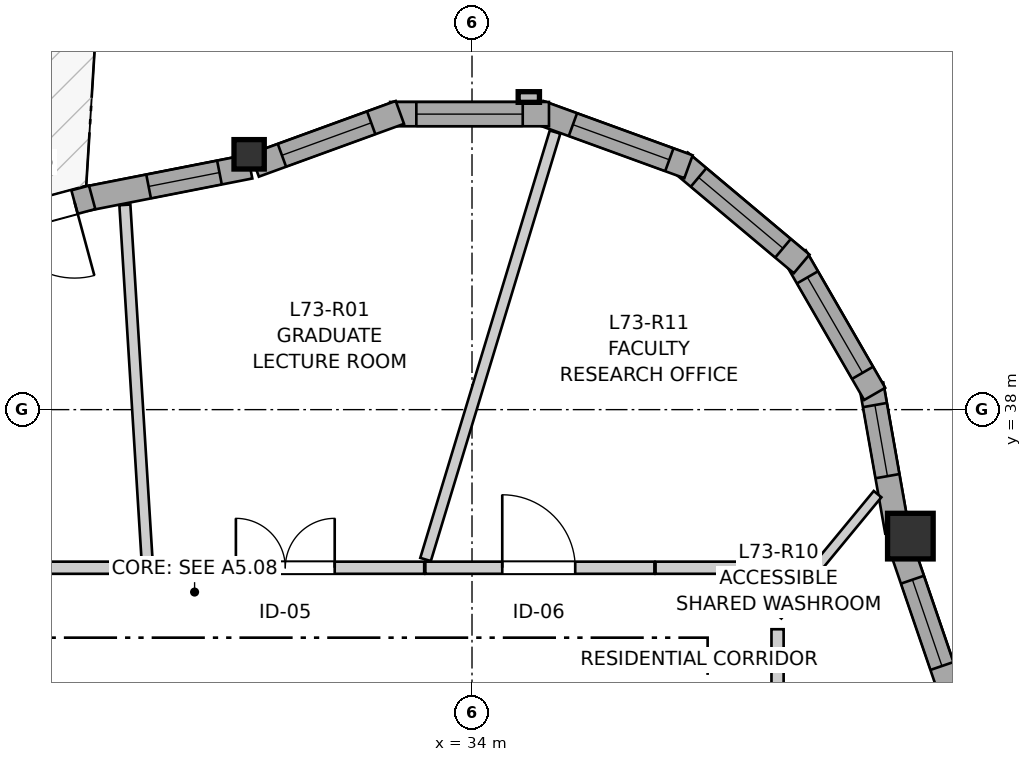
"""IFC4 building model, lengths in metres.
Left out: names, types, materials, properties, quantities, classifications, styles, units other than length and angle.
Written with IfcOpenShell. Run it as: python <this file> out.ifc"""

import sys

from ifc_helpers import new_model, si_unit, direction, frame, frame_2d, origin, origin_2d, place, context, subcontext, project, spatial, rectangle, i_section, extrude, source, transform, mapped, element, fill, save


model = new_model("IFC4")
c1 = context("Model", 3, precision=1e-05, world=origin(), true_north=direction((0.0, 1.0)))
c2 = subcontext(c1, "Body", "Model", "MODEL_VIEW")
j1 = project(units=[si_unit("LENGTHUNIT", "METRE"), si_unit("PLANEANGLEUNIT", "RADIAN")], contexts=[c1])
p1 = place(None, origin())
s1 = spatial("IfcSite", under=j1, at=p1, CompositionType="ELEMENT")
p2 = place(p1, origin())
s2 = spatial("IfcBuilding", under=s1, at=p2, CompositionType="ELEMENT")
p3 = place(p2, frame((0.0, 0.0, 243.6)))
s3 = spatial("IfcBuildingStorey", under=s2, at=p3, CompositionType="ELEMENT", Elevation=243.6)
m1 = source(origin(), c2, "Body", "SweptSolid", [
    extrude(rectangle(XDim=0.6, YDim=0.6, at=origin_2d()), origin(), (0.0, 0.0, 1.0), 2.96),
])
p4 = place(p3, frame((39.768, 36.336, 0.0), z_axis=(0.0, 0.0, 1.0), x_axis=(1.0, 0.0, 0.0)))
e1 = element("IfcColumn", 1, at=p4, inside=s3, PredefinedType="COLUMN", context=c2, shape_type="MappedRepresentation", body=[
    mapped(m1, transform((0.0, 0.0, 0.0), x_axis=(1.0, 0.0, 0.0), y_axis=(0.0, 1.0, 0.0), z_axis=(0.0, 0.0, 1.0), scale=1.0)),
])
m2 = source(origin(), c2, "Body", "SweptSolid", [
    extrude(i_section(OverallWidth=0.398, OverallDepth=0.387, WebThickness=0.019, FlangeThickness=0.03, FilletRadius=0.015, at=origin_2d()), origin(), (0.0, 0.0, 1.0), 2.96),
])
p5 = place(p3, frame((31.067, 41.359, 0.0), z_axis=(0.0, 0.0, 1.0), x_axis=(1.0, 0.0, 0.0)))
e2 = element("IfcColumn", 2, at=p5, inside=s3, PredefinedType="PILASTER", context=c2, shape_type="MappedRepresentation", body=[
    mapped(m2, transform((0.0, 0.0, 0.0), x_axis=(1.0, 0.0, 0.0), y_axis=(0.0, 1.0, 0.0), z_axis=(0.0, 0.0, 1.0), scale=1.0)),
])
p6 = place(p3, frame((40.335, 34.181, 0.0), z_axis=(0.0, 0.0, 1.0), x_axis=(-0.323601383087, 0.946193502865, 0.0)))
e3 = element("IfcWall", 3, at=p6, inside=s3, PredefinedType="SOLIDWALL", context=c2, shape_type="SweptSolid", body=[
    extrude(rectangle(XDim=2.133, YDim=0.32, at=frame_2d((1.066, 0.0))), origin(), (0.0, 0.0, 1.0), 2.58),
])
p7 = place(p6, frame((0.471, 0.0, 0.82)))
e4 = element("IfcOpeningElement", 4, at=p7, cuts=e3, PredefinedType="OPENING", context=c2, shape_type="SweptSolid", body=[
    extrude(rectangle(XDim=1.2, YDim=1.45, at=frame_2d((0.6, 0.725))), frame((0.0, 0.17, 0.0), z_axis=(0.0, -1.0, 0.0), x_axis=(1.0, 0.0, 0.0)), (0.0, 0.0, 1.0), 0.34),
])
p8 = place(p3, frame((39.594, 36.397, 0.0), z_axis=(0.0, 0.0, 1.0), x_axis=(-0.173671780312, 0.984803590937, 0.0)))
e5 = element("IfcWall", 5, at=p8, inside=s3, PredefinedType="SOLIDWALL", context=c2, shape_type="SweptSolid", body=[
    extrude(rectangle(XDim=1.962, YDim=0.32, at=frame_2d((0.981, 0.0))), origin(), (0.0, 0.0, 1.0), 2.58),
])
p9 = place(p8, frame((0.739, 0.0, 0.82)))
e6 = element("IfcOpeningElement", 6, at=p9, cuts=e5, PredefinedType="OPENING", context=c2, shape_type="SweptSolid", body=[
    extrude(rectangle(XDim=0.95, YDim=1.35, at=frame_2d((0.475, 0.675))), frame((0.0, 0.17, 0.0), z_axis=(0.0, -1.0, 0.0), x_axis=(1.0, 0.0, 0.0)), (0.0, 0.0, 1.0), 0.34),
])
p10 = place(p3, frame((39.298, 38.207, 0.0), z_axis=(0.0, 0.0, 1.0), x_axis=(-0.499995423472, 0.866028046028, 0.0)))
e7 = element("IfcWall", 7, at=p10, inside=s3, PredefinedType="SOLIDWALL", context=c2, shape_type="SweptSolid", body=[
    extrude(rectangle(XDim=2.09, YDim=0.32, at=frame_2d((1.045, 0.0))), origin(), (0.0, 0.0, 1.0), 2.58),
])
p11 = place(p10, frame((0.32, 0.0, 0.82)))
e8 = element("IfcOpeningElement", 8, at=p11, cuts=e7, PredefinedType="OPENING", context=c2, shape_type="SweptSolid", body=[
    extrude(rectangle(XDim=1.45, YDim=1.25, at=frame_2d((0.725, 0.625))), frame((0.0, 0.17, 0.0), z_axis=(0.0, -1.0, 0.0), x_axis=(1.0, 0.0, 0.0)), (0.0, 0.0, 1.0), 0.34),
])
p12 = place(p3, frame((38.337, 39.917, 0.0), z_axis=(0.0, 0.0, 1.0), x_axis=(-0.766024572719, 0.642811289563, 0.0)))
e9 = element("IfcWall", 9, at=p12, inside=s3, PredefinedType="SOLIDWALL", context=c2, shape_type="SweptSolid", body=[
    extrude(rectangle(XDim=2.09, YDim=0.32, at=frame_2d((1.045, 0.0))), origin(), (0.0, 0.0, 1.0), 2.58),
])
p13 = place(p12, frame((0.32, 0.0, 0.82)))
e10 = element("IfcOpeningElement", 10, at=p13, cuts=e9, PredefinedType="OPENING", context=c2, shape_type="SweptSolid", body=[
    extrude(rectangle(XDim=1.45, YDim=1.25, at=frame_2d((0.725, 0.625))), frame((0.0, 0.17, 0.0), z_axis=(0.0, -1.0, 0.0), x_axis=(1.0, 0.0, 0.0)), (0.0, 0.0, 1.0), 0.34),
])
p14 = place(p3, frame((36.848, 41.196, 0.0), z_axis=(0.0, 0.0, 1.0), x_axis=(-0.93973543134, 0.341902499383, 0.0)))
e11 = element("IfcWall", 11, at=p14, inside=s3, PredefinedType="SOLIDWALL", context=c2, shape_type="SweptSolid", body=[
    extrude(rectangle(XDim=2.09, YDim=0.32, at=frame_2d((1.045, 0.0))), origin(), (0.0, 0.0, 1.0), 2.58),
])
p15 = place(p14, frame((0.269, 0.0, 0.82)))
e12 = element("IfcOpeningElement", 12, at=p15, cuts=e11, PredefinedType="OPENING", context=c2, shape_type="SweptSolid", body=[
    extrude(rectangle(XDim=1.35, YDim=1.45, at=frame_2d((0.675, 0.725))), frame((0.0, 0.17, 0.0), z_axis=(0.0, -1.0, 0.0), x_axis=(1.0, 0.0, 0.0)), (0.0, 0.0, 1.0), 0.34),
])
p16 = place(p3, frame((35.013, 41.888, 0.0), z_axis=(0.0, 0.0, 1.0), x_axis=(-1.0, 0.0, 0.0)))
e13 = element("IfcWall", 13, at=p16, inside=s3, PredefinedType="SOLIDWALL", context=c2, shape_type="SweptSolid", body=[
    extrude(rectangle(XDim=2.09, YDim=0.32, at=frame_2d((1.045, 0.0))), origin(), (0.0, 0.0, 1.0), 2.58),
])
p17 = place(p16, frame((0.345, 0.0, 0.82)))
e14 = element("IfcOpeningElement", 14, at=p17, cuts=e13, PredefinedType="OPENING", context=c2, shape_type="SweptSolid", body=[
    extrude(rectangle(XDim=1.4, YDim=1.35, at=frame_2d((0.7, 0.675))), frame((0.0, 0.17, 0.0), z_axis=(0.0, -1.0, 0.0), x_axis=(1.0, 0.0, 0.0)), (0.0, 0.0, 1.0), 0.34),
])
p18 = place(p3, frame((33.051, 41.91, 0.0), z_axis=(0.0, 0.0, 1.0), x_axis=(-0.939730268502, -0.341916689358, 0.0)))
e15 = element("IfcWall", 15, at=p18, inside=s3, PredefinedType="SOLIDWALL", context=c2, shape_type="SweptSolid", body=[
    extrude(rectangle(XDim=2.032, YDim=0.32, at=frame_2d((1.016, 0.0))), origin(), (0.0, 0.0, 1.0), 2.58),
])
p19 = place(p18, frame((0.401, 0.0, 0.82)))
e16 = element("IfcOpeningElement", 16, at=p19, cuts=e15, PredefinedType="OPENING", context=c2, shape_type="SweptSolid", body=[
    extrude(rectangle(XDim=1.25, YDim=1.35, at=frame_2d((0.625, 0.675))), frame((0.0, 0.17, 0.0), z_axis=(0.0, -1.0, 0.0), x_axis=(1.0, 0.0, 0.0)), (0.0, 0.0, 1.0), 0.34),
])
p20 = place(p3, frame((31.079, 41.198, 0.0), z_axis=(0.0, 0.0, 1.0), x_axis=(-0.981223354781, -0.192874902544, 0.0)))
e17 = element("IfcWall", 17, at=p20, inside=s3, PredefinedType="SOLIDWALL", context=c2, shape_type="SweptSolid", body=[
    extrude(rectangle(XDim=2.202, YDim=0.32, at=frame_2d((1.101, 0.0))), origin(), (0.0, 0.0, 1.0), 2.58),
])
p21 = place(p20, frame((0.409, 0.0, 0.82)))
e18 = element("IfcOpeningElement", 18, at=p21, cuts=e17, PredefinedType="OPENING", context=c2, shape_type="SweptSolid", body=[
    extrude(rectangle(XDim=0.95, YDim=1.35, at=frame_2d((0.475, 0.675))), frame((0.0, 0.17, 0.0), z_axis=(0.0, -1.0, 0.0), x_axis=(1.0, 0.0, 0.0)), (0.0, 0.0, 1.0), 0.34),
])
p22 = place(p3, frame((29.002, 40.793, 0.0), z_axis=(0.0, 0.0, 1.0), x_axis=(-0.965467637734, -0.260523013357, 0.0)))
e19 = element("IfcWall", 19, at=p22, inside=s3, PredefinedType="SOLIDWALL", context=c2, shape_type="SweptSolid", body=[
    extrude(rectangle(XDim=2.087, YDim=0.32, at=frame_2d((1.043, 0.0))), origin(), (0.0, 0.0, 1.0), 2.58),
])
p23 = place(p22, frame((0.24, 0.0, 0.0)))
e20 = element("IfcOpeningElement", 20, at=p23, cuts=e19, PredefinedType="OPENING", context=c2, shape_type="SweptSolid", body=[
    extrude(rectangle(XDim=1.0, YDim=2.1, at=frame_2d((0.5, 1.05))), frame((0.0, 0.17, 0.0), z_axis=(0.0, -1.0, 0.0), x_axis=(1.0, 0.0, 0.0)), (0.0, 0.0, 1.0), 0.34),
])
p24 = place(p3, frame((24.3, 35.92, 0.0), z_axis=(0.0, 0.0, 1.0), x_axis=(1.0, 0.0, 0.0)))
e21 = element("IfcWall", 21, at=p24, inside=s3, PredefinedType="PARTITIONING", context=c2, shape_type="SweptSolid", body=[
    extrude(rectangle(XDim=5.446, YDim=0.16, at=frame_2d((2.723, 0.0))), origin(), (0.0, 0.0, 1.0), 2.96),
])
p25 = place(p24, frame((2.236, 0.0, 0.0)))
e22 = element("IfcOpeningElement", 22, at=p25, cuts=e21, PredefinedType="OPENING", context=c2, shape_type="SweptSolid", body=[
    extrude(rectangle(XDim=0.96, YDim=2.1, at=frame_2d((0.48, 1.05))), frame((0.0, 0.09, 0.0), z_axis=(0.0, -1.0, 0.0), x_axis=(1.0, 0.0, 0.0)), (0.0, 0.0, 1.0), 0.18),
])
p26 = place(p3, frame((29.761, 35.92, 0.0), z_axis=(0.0, 0.0, 1.0), x_axis=(1.0, 0.0, 0.0)))
e23 = element("IfcWall", 23, at=p26, inside=s3, PredefinedType="PARTITIONING", context=c2, shape_type="SweptSolid", body=[
    extrude(rectangle(XDim=3.61, YDim=0.16, at=frame_2d((1.805, 0.0))), origin(), (0.0, 0.0, 1.0), 2.96),
])
p27 = place(p26, frame((1.133, 0.0, 0.0)))
e24 = element("IfcOpeningElement", 24, at=p27, cuts=e23, PredefinedType="OPENING", context=c2, shape_type="SweptSolid", body=[
    extrude(rectangle(XDim=1.3, YDim=2.1, at=frame_2d((0.65, 1.05))), frame((0.0, 0.09, 0.0), z_axis=(0.0, -1.0, 0.0), x_axis=(1.0, 0.0, 0.0)), (0.0, 0.0, 1.0), 0.18),
])
p28 = place(p3, frame((33.386, 35.92, 0.0), z_axis=(0.0, 0.0, 1.0), x_axis=(1.0, 0.0, 0.0)))
e25 = element("IfcWall", 25, at=p28, inside=s3, PredefinedType="PARTITIONING", context=c2, shape_type="SweptSolid", body=[
    extrude(rectangle(XDim=3.014, YDim=0.16, at=frame_2d((1.507, 0.0))), origin(), (0.0, 0.0, 1.0), 2.598),
])
p29 = place(p28, frame((1.012, 0.0, 0.0)))
e26 = element("IfcOpeningElement", 26, at=p29, cuts=e25, PredefinedType="OPENING", context=c2, shape_type="SweptSolid", body=[
    extrude(rectangle(XDim=0.96, YDim=2.1, at=frame_2d((0.48, 1.05))), frame((0.0, 0.09, 0.0), z_axis=(0.0, -1.0, 0.0), x_axis=(1.0, 0.0, 0.0)), (0.0, 0.0, 1.0), 0.18),
])
p30 = place(p3, frame((33.389, 36.029, 0.0), z_axis=(0.0, 0.0, 1.0), x_axis=(0.289965875663, 0.957036985153, 0.0)))
e27 = element("IfcWall", 27, at=p30, inside=s3, PredefinedType="PARTITIONING", context=c2, shape_type="SweptSolid", body=[
    extrude(rectangle(XDim=5.875, YDim=0.145, at=frame_2d((2.938, 0.0))), origin(), (0.0, 0.0, 1.0), 2.96),
])
p31 = place(p3, frame((29.433, 40.694, 0.0), z_axis=(0.0, 0.0, 1.0), x_axis=(0.062358842424, -0.998053793526, 0.0)))
e28 = element("IfcWall", 28, at=p31, inside=s3, PredefinedType="PARTITIONING", context=c2, shape_type="SweptSolid", body=[
    extrude(rectangle(XDim=4.69, YDim=0.145, at=frame_2d((2.345, 0.0))), origin(), (0.0, 0.0, 1.0), 2.96),
])
p32 = place(p3, frame((38.02, 35.294, 0.0), z_axis=(0.0, 0.0, 1.0), x_axis=(0.636518208935, 0.771261673943, 0.0)))
e29 = element("IfcWall", 29, at=p32, inside=s3, PredefinedType="PARTITIONING", context=c2, shape_type="SweptSolid", body=[
    extrude(rectangle(XDim=2.067, YDim=0.13, at=frame_2d((1.034, 0.0))), origin(), (0.0, 0.0, 1.0), 2.96),
])
p33 = place(p3, frame((36.415, 35.92, 0.0), z_axis=(0.0, 0.0, 1.0), x_axis=(1.0, 0.0, 0.0)))
e30 = element("IfcWall", 30, at=p33, inside=s3, PredefinedType="PARTITIONING", context=c2, shape_type="SweptSolid", body=[
    extrude(rectangle(XDim=1.605, YDim=0.16, at=frame_2d((0.802, 0.0))), origin(), (0.0, 0.0, 1.0), 2.598),
])
p34 = place(p3, frame((38.02, 34.315, 0.0), z_axis=(0.0, 0.0, 1.0), x_axis=(0.0, 1.0, 0.0)))
e31 = element("IfcWall", 31, at=p34, inside=s3, PredefinedType="PARTITIONING", context=c2, shape_type="SweptSolid", body=[
    extrude(rectangle(XDim=0.796, YDim=0.16, at=frame_2d((0.398, 0.0))), origin(), (0.0, 0.0, 1.0), 2.96),
])
p35 = place(p3, frame((38.02, 35.423, 0.0), z_axis=(0.0, 0.0, 1.0), x_axis=(0.0, 1.0, 0.0)))
e32 = element("IfcWall", 32, at=p35, inside=s3, PredefinedType="PARTITIONING", context=c2, shape_type="SweptSolid", body=[
    extrude(rectangle(XDim=0.497, YDim=0.16, at=frame_2d((0.249, 0.0))), origin(), (0.0, 0.0, 1.0), 2.96),
])
m3 = source(origin(), c2, "Body", "SweptSolid", [
    extrude(rectangle(XDim=1.2, YDim=1.45, at=frame_2d((0.6, 0.725))), frame((0.0, 0.03, 0.0), z_axis=(0.0, -1.0, 0.0), x_axis=(1.0, 0.0, 0.0)), (0.0, 0.0, 1.0), 0.06),
])
p36 = place(p7, origin())
e33 = element("IfcWindow", 33, at=p36, inside=s3, PartitioningType="SINGLE_PANEL", PredefinedType="WINDOW", context=c2, shape_type="MappedRepresentation", body=[
    mapped(m3, transform((0.0, 0.0, 0.0), x_axis=(1.0, 0.0, 0.0), y_axis=(0.0, 1.0, 0.0), z_axis=(0.0, 0.0, 1.0), scale=1.0)),
])
fill(e4, e33)
m4 = source(origin(), c2, "Body", "SweptSolid", [
    extrude(rectangle(XDim=0.95, YDim=1.35, at=frame_2d((0.475, 0.675))), frame((0.0, 0.03, 0.0), z_axis=(0.0, -1.0, 0.0), x_axis=(1.0, 0.0, 0.0)), (0.0, 0.0, 1.0), 0.06),
])
p37 = place(p9, origin())
e34 = element("IfcWindow", 34, at=p37, inside=s3, PartitioningType="SINGLE_PANEL", PredefinedType="WINDOW", context=c2, shape_type="MappedRepresentation", body=[
    mapped(m4, transform((0.0, 0.0, 0.0), x_axis=(1.0, 0.0, 0.0), y_axis=(0.0, 1.0, 0.0), z_axis=(0.0, 0.0, 1.0), scale=1.0)),
])
fill(e6, e34)
m5 = source(origin(), c2, "Body", "SweptSolid", [
    extrude(rectangle(XDim=1.45, YDim=1.25, at=frame_2d((0.725, 0.625))), frame((0.0, 0.03, 0.0), z_axis=(0.0, -1.0, 0.0), x_axis=(1.0, 0.0, 0.0)), (0.0, 0.0, 1.0), 0.06),
])
p38 = place(p11, origin())
e35 = element("IfcWindow", 35, at=p38, inside=s3, PartitioningType="SINGLE_PANEL", PredefinedType="WINDOW", context=c2, shape_type="MappedRepresentation", body=[
    mapped(m5, transform((0.0, 0.0, 0.0), x_axis=(1.0, 0.0, 0.0), y_axis=(0.0, 1.0, 0.0), z_axis=(0.0, 0.0, 1.0), scale=1.0)),
])
fill(e8, e35)
p39 = place(p13, origin())
e36 = element("IfcWindow", 36, at=p39, inside=s3, PartitioningType="SINGLE_PANEL", PredefinedType="WINDOW", context=c2, shape_type="MappedRepresentation", body=[
    mapped(m5, transform((0.0, 0.0, 0.0), x_axis=(1.0, 0.0, 0.0), y_axis=(0.0, 1.0, 0.0), z_axis=(0.0, 0.0, 1.0), scale=1.0)),
])
fill(e10, e36)
m6 = source(origin(), c2, "Body", "SweptSolid", [
    extrude(rectangle(XDim=1.35, YDim=1.45, at=frame_2d((0.675, 0.725))), frame((0.0, 0.03, 0.0), z_axis=(0.0, -1.0, 0.0), x_axis=(1.0, 0.0, 0.0)), (0.0, 0.0, 1.0), 0.06),
])
p40 = place(p15, origin())
e37 = element("IfcWindow", 37, at=p40, inside=s3, PartitioningType="SINGLE_PANEL", PredefinedType="WINDOW", context=c2, shape_type="MappedRepresentation", body=[
    mapped(m6, transform((0.0, 0.0, 0.0), x_axis=(1.0, 0.0, 0.0), y_axis=(0.0, 1.0, 0.0), z_axis=(0.0, 0.0, 1.0), scale=1.0)),
])
fill(e12, e37)
m7 = source(origin(), c2, "Body", "SweptSolid", [
    extrude(rectangle(XDim=1.4, YDim=1.35, at=frame_2d((0.7, 0.675))), frame((0.0, 0.03, 0.0), z_axis=(0.0, -1.0, 0.0), x_axis=(1.0, 0.0, 0.0)), (0.0, 0.0, 1.0), 0.06),
])
p41 = place(p17, origin())
e38 = element("IfcWindow", 38, at=p41, inside=s3, PartitioningType="SINGLE_PANEL", PredefinedType="WINDOW", context=c2, shape_type="MappedRepresentation", body=[
    mapped(m7, transform((0.0, 0.0, 0.0), x_axis=(1.0, 0.0, 0.0), y_axis=(0.0, 1.0, 0.0), z_axis=(0.0, 0.0, 1.0), scale=1.0)),
])
fill(e14, e38)
m8 = source(origin(), c2, "Body", "SweptSolid", [
    extrude(rectangle(XDim=1.25, YDim=1.35, at=frame_2d((0.625, 0.675))), frame((0.0, 0.03, 0.0), z_axis=(0.0, -1.0, 0.0), x_axis=(1.0, 0.0, 0.0)), (0.0, 0.0, 1.0), 0.06),
])
p42 = place(p19, origin())
e39 = element("IfcWindow", 39, at=p42, inside=s3, PartitioningType="SINGLE_PANEL", PredefinedType="WINDOW", context=c2, shape_type="MappedRepresentation", body=[
    mapped(m8, transform((0.0, 0.0, 0.0), x_axis=(1.0, 0.0, 0.0), y_axis=(0.0, 1.0, 0.0), z_axis=(0.0, 0.0, 1.0), scale=1.0)),
])
fill(e16, e39)
p43 = place(p21, origin())
e40 = element("IfcWindow", 40, at=p43, inside=s3, PartitioningType="SINGLE_PANEL", PredefinedType="WINDOW", context=c2, shape_type="MappedRepresentation", body=[
    mapped(m4, transform((0.0, 0.0, 0.0), x_axis=(1.0, 0.0, 0.0), y_axis=(0.0, 1.0, 0.0), z_axis=(0.0, 0.0, 1.0), scale=1.0)),
])
fill(e18, e40)
m9 = source(origin(), c2, "Body", "SweptSolid", [
    extrude(rectangle(XDim=1.0, YDim=2.1, at=frame_2d((0.5, 1.05))), frame((0.0, 0.025, 0.0), z_axis=(0.0, -1.0, 0.0), x_axis=(1.0, 0.0, 0.0)), (0.0, 0.0, 1.0), 0.05),
])
p44 = place(p23, origin())
e41 = element("IfcDoor", 41, at=p44, inside=s3, OperationType="SINGLE_SWING_LEFT", PredefinedType="DOOR", context=c2, shape_type="MappedRepresentation", body=[
    mapped(m9, transform((0.0, 0.0, 0.0), x_axis=(1.0, 0.0, 0.0), y_axis=(0.0, 1.0, 0.0), z_axis=(0.0, 0.0, 1.0), scale=1.0)),
])
fill(e20, e41)
m10 = source(origin(), c2, "Body", "SweptSolid", [
    extrude(rectangle(XDim=1.3, YDim=2.1, at=frame_2d((0.65, 1.05))), frame((0.0, 0.025, 0.0), z_axis=(0.0, -1.0, 0.0), x_axis=(1.0, 0.0, 0.0)), (0.0, 0.0, 1.0), 0.05),
])
p45 = place(p27, origin())
e42 = element("IfcDoor", 42, at=p45, inside=s3, OperationType="DOUBLE_DOOR_SINGLE_SWING", PredefinedType="DOOR", context=c2, shape_type="MappedRepresentation", body=[
    mapped(m10, transform((0.0, 0.0, 0.0), x_axis=(1.0, 0.0, 0.0), y_axis=(0.0, 1.0, 0.0), z_axis=(0.0, 0.0, 1.0), scale=1.0)),
])
fill(e24, e42)
m11 = source(origin(), c2, "Body", "SweptSolid", [
    extrude(rectangle(XDim=0.96, YDim=2.1, at=frame_2d((0.48, 1.05))), frame((0.0, 0.025, 0.0), z_axis=(0.0, -1.0, 0.0), x_axis=(1.0, 0.0, 0.0)), (0.0, 0.0, 1.0), 0.05),
])
p46 = place(p29, origin())
e43 = element("IfcDoor", 43, at=p46, inside=s3, OperationType="SINGLE_SWING_LEFT", PredefinedType="DOOR", context=c2, shape_type="MappedRepresentation", body=[
    mapped(m11, transform((0.0, 0.0, 0.0), x_axis=(1.0, 0.0, 0.0), y_axis=(0.0, 1.0, 0.0), z_axis=(0.0, 0.0, 1.0), scale=1.0)),
])
fill(e26, e43)
save(model, sys.argv[1])
